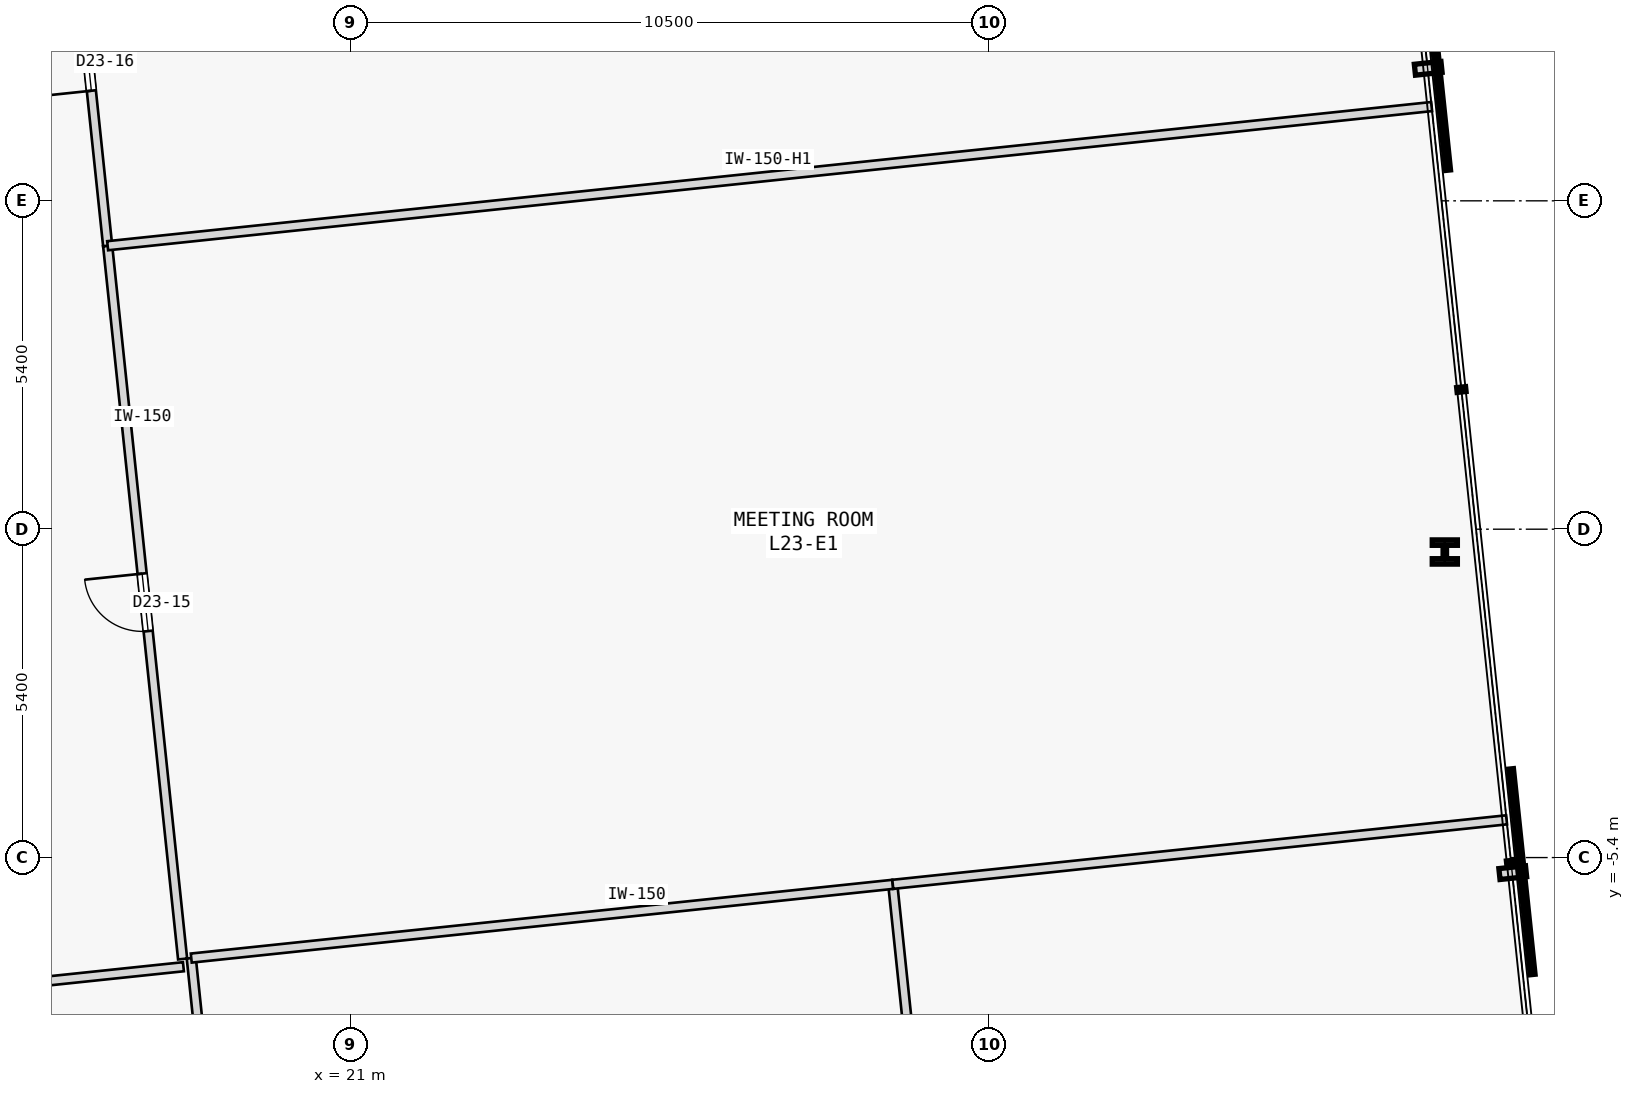
"""IFC4 building model, lengths in metres.
Left out: names, types, materials, properties, quantities, classifications, styles, units other than length and angle.
Written with IfcOpenShell. Run it as: python <this file> out.ifc"""

import sys

from ifc_helpers import new_model, si_unit, direction, frame, frame_2d, origin, origin_2d, place, context, subcontext, project, spatial, rectangle, i_section, extrude, element, fill, save


model = new_model("IFC4")
c1 = context("Model", 3, precision=1e-05, world=origin(), true_north=direction((0.0, 1.0)))
c2 = subcontext(c1, "Body", "Model", "MODEL_VIEW")
j1 = project(units=[si_unit("LENGTHUNIT", "METRE"), si_unit("PLANEANGLEUNIT", "RADIAN")], contexts=[c1])
p1 = place(None, origin())
s1 = spatial("IfcSite", under=j1, at=p1, CompositionType="ELEMENT")
p2 = place(p1, origin())
s2 = spatial("IfcBuilding", under=s1, at=p2, CompositionType="ELEMENT")
p3 = place(p2, frame((0.0, 0.0, 94.8)))
s3 = spatial("IfcBuildingStorey", under=s2, at=p3, CompositionType="ELEMENT", Elevation=94.8)
p4 = place(p3, frame((38.988, -0.375, 0.0), z_axis=(0.0, 0.0, 1.0), x_axis=(1.0, 0.0, 0.0)))
e1 = element("IfcColumn", 1, at=p4, inside=s3, PredefinedType="COLUMN", context=c2, shape_type="SweptSolid", body=[
    extrude(i_section(OverallWidth=0.413, OverallDepth=0.398, WebThickness=0.056, FlangeThickness=0.089, FilletRadius=0.015, at=origin_2d()), origin(), (0.0, 0.0, 1.0), 3.7),
])
p5 = place(p3, frame((1.082, -8.999, 0.0), z_axis=(0.0, 0.0, 1.0), x_axis=(0.994522803526, 0.104519822363, 0.0)))
e2 = element("IfcWall", 2, at=p5, inside=s3, PredefinedType="PARTITIONING", context=c2, shape_type="SweptSolid", body=[
    extrude(rectangle(XDim=17.257, YDim=0.15, at=frame_2d((8.628, 0.0))), origin(), (0.0, 0.0, 1.0), 3.475),
])
p6 = place(p5, frame((5.565, 0.0, 0.0)))
e3 = element("IfcOpeningElement", 3, at=p6, cuts=e2, PredefinedType="OPENING", context=c2, shape_type="SweptSolid", body=[
    extrude(rectangle(XDim=0.95, YDim=2.15, at=frame_2d((0.475, 1.075))), frame((0.0, 0.085, 0.0), z_axis=(0.0, -1.0, 0.0), x_axis=(1.0, 0.0, 0.0)), (0.0, 0.0, 1.0), 0.17),
])
p7 = place(p3, frame((18.231, -7.068, 0.0), z_axis=(0.0, 0.0, 1.0), x_axis=(-0.104536082083, 0.994521094569, 0.0)))
e4 = element("IfcWall", 4, at=p7, inside=s3, PredefinedType="PARTITIONING", context=c2, shape_type="SweptSolid", body=[
    extrude(rectangle(XDim=11.794, YDim=0.15, at=frame_2d((5.897, 0.0))), origin(), (0.0, 0.0, 1.0), 3.475),
])
p8 = place(p7, frame((5.422, 0.0, 0.0)))
e5 = element("IfcOpeningElement", 5, at=p8, cuts=e4, PredefinedType="OPENING", context=c2, shape_type="SweptSolid", body=[
    extrude(rectangle(XDim=0.95, YDim=2.15, at=frame_2d((0.475, 1.075))), frame((0.0, 0.085, 0.0), z_axis=(0.0, -1.0, 0.0), x_axis=(1.0, 0.0, 0.0)), (0.0, 0.0, 1.0), 0.17),
])
p9 = place(p3, frame((16.998, 4.662, 0.0), z_axis=(0.0, 0.0, 1.0), x_axis=(-0.104515354875, 0.994523273029, 0.0)))
e6 = element("IfcWall", 6, at=p9, inside=s3, PredefinedType="PARTITIONING", context=c2, shape_type="SweptSolid", body=[
    extrude(rectangle(XDim=6.076, YDim=0.15, at=frame_2d((3.038, 0.0))), origin(), (0.0, 0.0, 1.0), 3.475),
])
p10 = place(p9, frame((2.563, 0.0, 0.0)))
e7 = element("IfcOpeningElement", 7, at=p10, cuts=e6, PredefinedType="OPENING", context=c2, shape_type="SweptSolid", body=[
    extrude(rectangle(XDim=0.95, YDim=2.15, at=frame_2d((0.475, 1.075))), frame((0.0, 0.085, 0.0), z_axis=(0.0, -1.0, 0.0), x_axis=(1.0, 0.0, 0.0)), (0.0, 0.0, 1.0), 0.17),
])
p11 = place(p3, frame((19.651, -19.207, 0.0), z_axis=(0.0, 0.0, 1.0), x_axis=(-0.104540236679, 0.994520657862, 0.0)))
e8 = element("IfcWall", 8, at=p11, inside=s3, PredefinedType="PARTITIONING", context=c2, shape_type="SweptSolid", body=[
    extrude(rectangle(XDim=12.221, YDim=0.15, at=frame_2d((6.11, 0.0))), origin(), (0.0, 0.0, 1.0), 3.475),
])
p12 = place(p11, frame((5.635, 0.0, 0.0)))
e9 = element("IfcOpeningElement", 9, at=p12, cuts=e8, PredefinedType="OPENING", context=c2, shape_type="SweptSolid", body=[
    extrude(rectangle(XDim=0.95, YDim=2.15, at=frame_2d((0.475, 1.075))), frame((0.0, 0.085, 0.0), z_axis=(0.0, -1.0, 0.0), x_axis=(1.0, 0.0, 0.0)), (0.0, 0.0, 1.0), 0.17),
])
p13 = place(p3, frame((31.187, -17.994, 0.0), z_axis=(0.0, 0.0, 1.0), x_axis=(-0.104520477826, 0.99452273464, 0.0)))
e10 = element("IfcWall", 10, at=p13, inside=s3, PredefinedType="PARTITIONING", context=c2, shape_type="SweptSolid", body=[
    extrude(rectangle(XDim=12.221, YDim=0.15, at=frame_2d((6.11, 0.0))), origin(), (0.0, 0.0, 1.0), 3.475),
])
p14 = place(p13, frame((5.635, 0.0, 0.0)))
e11 = element("IfcOpeningElement", 11, at=p14, cuts=e10, PredefinedType="OPENING", context=c2, shape_type="SweptSolid", body=[
    extrude(rectangle(XDim=0.95, YDim=2.15, at=frame_2d((0.475, 1.075))), frame((0.0, 0.085, 0.0), z_axis=(0.0, -1.0, 0.0), x_axis=(1.0, 0.0, 0.0)), (0.0, 0.0, 1.0), 0.17),
])
p15 = place(p3, frame((18.373, -7.053, 0.0), z_axis=(0.0, 0.0, 1.0), x_axis=(0.994521010406, 0.104536882776, 0.0)))
e12 = element("IfcWall", 12, at=p15, inside=s3, PredefinedType="PARTITIONING", context=c2, shape_type="SweptSolid", body=[
    extrude(rectangle(XDim=11.6, YDim=0.15, at=frame_2d((5.8, 0.0))), origin(), (0.0, 0.0, 1.0), 3.475),
])
p16 = place(p3, frame((29.91, -5.84, 0.0), z_axis=(0.0, 0.0, 1.0), x_axis=(0.994521257273, 0.104534534165, 0.0)))
e13 = element("IfcWall", 13, at=p16, inside=s3, PredefinedType="PARTITIONING", context=c2, shape_type="SweptSolid", body=[
    extrude(rectangle(XDim=10.15, YDim=0.15, at=frame_2d((5.075, 0.0))), origin(), (0.0, 0.0, 1.0), 3.475),
])
p17 = place(p3, frame((16.998, 4.662, 0.0), z_axis=(0.0, 0.0, 1.0), x_axis=(0.994522487751, 0.10452282697, 0.0)))
e14 = element("IfcWall", 14, at=p17, inside=s3, PredefinedType="PARTITIONING", context=c2, shape_type="SweptSolid", body=[
    extrude(rectangle(XDim=21.893, YDim=0.15, at=frame_2d((10.947, 0.0))), origin(), (0.0, 0.0, 1.0), 3.025),
])
p18 = place(p8, origin())
e15 = element("IfcDoor", 15, at=p18, inside=s3, OperationType="SINGLE_SWING_RIGHT", PredefinedType="DOOR", context=c2, shape_type="SweptSolid", body=[
    extrude(rectangle(XDim=0.95, YDim=2.15, at=frame_2d((0.475, 1.075))), frame((0.0, 0.025, 0.0), z_axis=(0.0, -1.0, 0.0), x_axis=(1.0, 0.0, 0.0)), (0.0, 0.0, 1.0), 0.05),
])
fill(e5, e15)
p19 = place(p10, origin())
e16 = element("IfcDoor", 16, at=p19, inside=s3, OperationType="SINGLE_SWING_LEFT", PredefinedType="DOOR", context=c2, shape_type="SweptSolid", body=[
    extrude(rectangle(XDim=0.95, YDim=2.15, at=frame_2d((0.475, 1.075))), frame((0.0, 0.025, 0.0), z_axis=(0.0, -1.0, 0.0), x_axis=(1.0, 0.0, 0.0)), (0.0, 0.0, 1.0), 0.05),
])
fill(e7, e16)
save(model, sys.argv[1])
